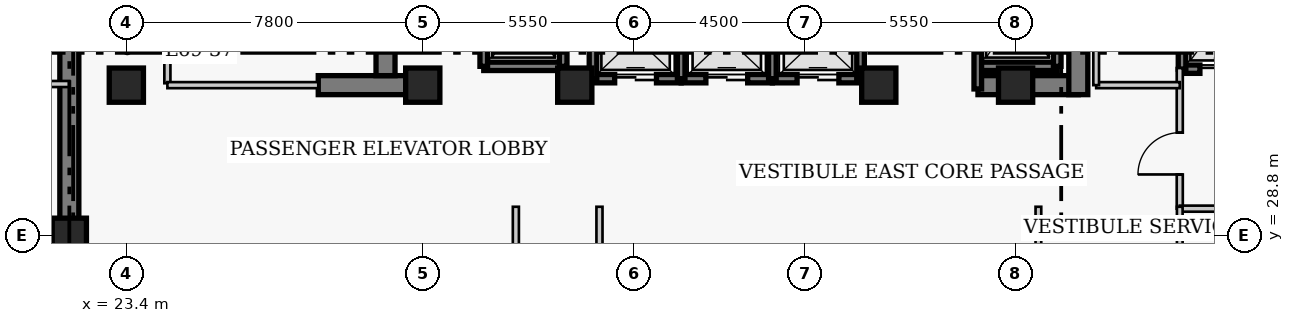
"""IFC4 building model, lengths in metres.
Left out: names, types, materials, properties, quantities, classifications, styles, units other than length and angle.
Written with IfcOpenShell. Run it as: python <this file> out.ifc"""

import sys

from ifc_helpers import new_model, si_unit, direction, frame, frame_2d, origin, origin_2d, place, context, subcontext, project, spatial, rectangle, extrude, element, fill, save


model = new_model("IFC4")
c1 = context("Model", 3, precision=1e-05, world=origin(), true_north=direction((0.0, 1.0)))
c2 = subcontext(c1, "Body", "Model", "MODEL_VIEW")
j1 = project(units=[si_unit("LENGTHUNIT", "METRE"), si_unit("PLANEANGLEUNIT", "RADIAN")], contexts=[c1])
p1 = place(None, origin())
s1 = spatial("IfcSite", under=j1, at=p1, CompositionType="ELEMENT")
p2 = place(p1, origin())
s2 = spatial("IfcBuilding", under=s1, at=p2, CompositionType="ELEMENT")
p3 = place(p2, frame((0.0, 0.0, 277.4)))
s3 = spatial("IfcBuildingStorey", under=s2, at=p3, CompositionType="ELEMENT", Elevation=277.4)
p4 = place(p3, frame((21.9, 27.05, 0.0), z_axis=(0.0, 0.0, 1.0), x_axis=(0.0, 1.0, 0.0)))
e1 = element("IfcWall", 1, at=p4, inside=s3, PredefinedType="SHEAR", context=c2, shape_type="SweptSolid", body=[
    extrude(rectangle(XDim=13.52, YDim=0.5, at=frame_2d((6.76, 0.0))), origin(), (0.0, 0.0, 1.0), 4.0),
])
p5 = place(p3, frame((28.45, 32.75, 0.0), z_axis=(0.0, 0.0, 1.0), x_axis=(1.0, 0.0, 0.0)))
e2 = element("IfcWall", 2, at=p5, inside=s3, PredefinedType="SHEAR", context=c2, shape_type="SweptSolid", body=[
    extrude(rectangle(XDim=2.4, YDim=0.5, at=frame_2d((1.2, 0.0))), origin(), (0.0, 0.0, 1.0), 4.0),
])
p6 = place(p3, frame((45.81, 32.75, 0.0), z_axis=(0.0, 0.0, 1.0), x_axis=(1.0, 0.0, 0.0)))
e3 = element("IfcWall", 3, at=p6, inside=s3, PredefinedType="SHEAR", context=c2, shape_type="SweptSolid", body=[
    extrude(rectangle(XDim=2.64, YDim=0.5, at=frame_2d((1.32, 0.0))), origin(), (0.0, 0.0, 1.0), 4.0),
])
p7 = place(p3, frame((30.22, 33.0, 0.0), z_axis=(0.0, 0.0, 1.0), x_axis=(0.0, 1.0, 0.0)))
e4 = element("IfcWall", 4, at=p7, inside=s3, PredefinedType="SHEAR", context=c2, shape_type="SweptSolid", body=[
    extrude(rectangle(XDim=7.32, YDim=0.5, at=frame_2d((3.66, 0.0))), origin(), (0.0, 0.0, 1.0), 4.0),
])
p8 = place(p3, frame((48.45, 32.5, 0.0), z_axis=(0.0, 0.0, 1.0), x_axis=(0.0, 1.0, 0.0)))
e5 = element("IfcWall", 5, at=p8, inside=s3, PredefinedType="SHEAR", context=c2, shape_type="SweptSolid", body=[
    extrude(rectangle(XDim=7.82, YDim=0.5, at=frame_2d((3.91, 0.0))), origin(), (0.0, 0.0, 1.0), 4.0),
])
p9 = place(p8, frame((5.7, 0.0, 0.0)))
e6 = element("IfcOpeningElement", 6, at=p9, cuts=e5, PredefinedType="OPENING", context=c2, shape_type="SweptSolid", body=[
    extrude(rectangle(XDim=1.1, YDim=2.15, at=frame_2d((0.55, 1.075))), frame((0.0, 0.26, 0.0), z_axis=(0.0, -1.0, 0.0), x_axis=(1.0, 0.0, 0.0)), (0.0, 0.0, 1.0), 0.52),
])
for number, where, z_axis, x_axis in (
    (7, (21.9, 28.8, 0.0), (0.0, 0.0, 1.0), (1.0, 0.0, 0.0)),
    (8, (23.4, 32.75, 0.0), (0.0, 0.0, 1.0), (1.0, 0.0, 0.0)),
    (9, (31.2, 32.75, 0.0), (0.0, 0.0, 1.0), (1.0, 0.0, 0.0)),
    (10, (35.2, 32.75, 0.0), (0.0, 0.0, 1.0), (1.0, 0.0, 0.0)),
    (11, (43.2, 32.75, 0.0), (0.0, 0.0, 1.0), (1.0, 0.0, 0.0)),
    (12, (46.8, 32.75, 0.0), (0.0, 0.0, 1.0), (1.0, 0.0, 0.0)),
):
    element("IfcColumn", number, at=place(p3, frame(where, z_axis=z_axis, x_axis=x_axis)), inside=s3, PredefinedType="COLUMN", context=c2, shape_type="SweptSolid", body=[
        extrude(rectangle(XDim=0.9, YDim=0.9, at=origin_2d()), origin(), (0.0, 0.0, 1.0), 4.0),
    ])
p10 = place(p3, frame((35.68, 32.92, 0.0), z_axis=(0.0, 0.0, 1.0), x_axis=(1.0, 0.0, 0.0)))
e13 = element("IfcWall", 13, at=p10, inside=s3, PredefinedType="SHEAR", context=c2, shape_type="SweptSolid", body=[
    extrude(rectangle(XDim=2.32, YDim=0.22, at=frame_2d((1.16, 0.0))), origin(), (0.0, 0.0, 1.0), 4.0),
])
p11 = place(p10, frame((0.57, 0.0, 0.0)))
e14 = element("IfcOpeningElement", 14, at=p11, cuts=e13, PredefinedType="OPENING", context=c2, shape_type="SweptSolid", body=[
    extrude(rectangle(XDim=1.1, YDim=2.15, at=frame_2d((0.55, 1.075))), frame((0.0, 0.12, 0.0), z_axis=(0.0, -1.0, 0.0), x_axis=(1.0, 0.0, 0.0)), (0.0, 0.0, 1.0), 0.24),
])
p12 = place(p3, frame((35.68, 32.92, 0.0), z_axis=(0.0, 0.0, 1.0), x_axis=(0.0, 1.0, 0.0)))
e15 = element("IfcWall", 15, at=p12, inside=s3, PredefinedType="SHEAR", context=c2, shape_type="SweptSolid", body=[
    extrude(rectangle(XDim=2.16, YDim=0.2, at=frame_2d((1.08, 0.0))), origin(), (0.0, 0.0, 1.0), 4.0),
])
p13 = place(p3, frame((38.0, 32.92, 0.0), z_axis=(0.0, 0.0, 1.0), x_axis=(1.0, 0.0, 0.0)))
e16 = element("IfcWall", 16, at=p13, inside=s3, PredefinedType="SHEAR", context=c2, shape_type="SweptSolid", body=[
    extrude(rectangle(XDim=2.4, YDim=0.22, at=frame_2d((1.2, 0.0))), origin(), (0.0, 0.0, 1.0), 4.0),
])
p14 = place(p13, frame((0.65, 0.0, 0.0)))
e17 = element("IfcOpeningElement", 17, at=p14, cuts=e16, PredefinedType="OPENING", context=c2, shape_type="SweptSolid", body=[
    extrude(rectangle(XDim=1.1, YDim=2.15, at=frame_2d((0.55, 1.075))), frame((0.0, 0.12, 0.0), z_axis=(0.0, -1.0, 0.0), x_axis=(1.0, 0.0, 0.0)), (0.0, 0.0, 1.0), 0.24),
])
p15 = place(p3, frame((38.0, 32.92, 0.0), z_axis=(0.0, 0.0, 1.0), x_axis=(0.0, 1.0, 0.0)))
e18 = element("IfcWall", 18, at=p15, inside=s3, PredefinedType="SHEAR", context=c2, shape_type="SweptSolid", body=[
    extrude(rectangle(XDim=2.16, YDim=0.2, at=frame_2d((1.08, 0.0))), origin(), (0.0, 0.0, 1.0), 4.0),
])
p16 = place(p3, frame((40.4, 32.92, 0.0), z_axis=(0.0, 0.0, 1.0), x_axis=(1.0, 0.0, 0.0)))
e19 = element("IfcWall", 19, at=p16, inside=s3, PredefinedType="SHEAR", context=c2, shape_type="SweptSolid", body=[
    extrude(rectangle(XDim=2.32, YDim=0.22, at=frame_2d((1.16, 0.0))), origin(), (0.0, 0.0, 1.0), 4.0),
])
p17 = place(p16, frame((0.65, 0.0, 0.0)))
e20 = element("IfcOpeningElement", 20, at=p17, cuts=e19, PredefinedType="OPENING", context=c2, shape_type="SweptSolid", body=[
    extrude(rectangle(XDim=1.1, YDim=2.15, at=frame_2d((0.55, 1.075))), frame((0.0, 0.12, 0.0), z_axis=(0.0, -1.0, 0.0), x_axis=(1.0, 0.0, 0.0)), (0.0, 0.0, 1.0), 0.24),
])
for number, where, z_axis, x_axis in (
    (21, (40.4, 32.92, 0.0), (0.0, 0.0, 1.0), (0.0, 1.0, 0.0)),
    (22, (42.72, 32.92, 0.0), (0.0, 0.0, 1.0), (0.0, 1.0, 0.0)),
):
    element("IfcWall", number, at=place(p3, frame(where, z_axis=z_axis, x_axis=x_axis)), inside=s3, PredefinedType="SHEAR", context=c2, shape_type="SweptSolid", body=[
        extrude(rectangle(XDim=2.16, YDim=0.2, at=frame_2d((1.08, 0.0))), origin(), (0.0, 0.0, 1.0), 4.0),
    ])
p18 = place(p3, frame((51.18, 33.17, 0.0), z_axis=(0.0, 0.0, 1.0), x_axis=(1.0, 0.0, 0.0)))
e23 = element("IfcWall", 23, at=p18, inside=s3, PredefinedType="SHEAR", context=c2, shape_type="SweptSolid", body=[
    extrude(rectangle(XDim=2.42, YDim=0.22, at=frame_2d((1.21, 0.0))), origin(), (0.0, 0.0, 1.0), 4.0),
])
p19 = place(p18, frame((0.47, 0.0, 0.0)))
e24 = element("IfcOpeningElement", 24, at=p19, cuts=e23, PredefinedType="OPENING", context=c2, shape_type="SweptSolid", body=[
    extrude(rectangle(XDim=1.3, YDim=2.15, at=frame_2d((0.65, 1.075))), frame((0.0, 0.12, 0.0), z_axis=(0.0, -1.0, 0.0), x_axis=(1.0, 0.0, 0.0)), (0.0, 0.0, 1.0), 0.24),
])
p20 = place(p3, frame((51.18, 33.17, 0.0), z_axis=(0.0, 0.0, 1.0), x_axis=(0.0, 1.0, 0.0)))
e25 = element("IfcWall", 25, at=p20, inside=s3, PredefinedType="SHEAR", context=c2, shape_type="SweptSolid", body=[
    extrude(rectangle(XDim=2.86, YDim=0.2, at=frame_2d((1.43, 0.0))), origin(), (0.0, 0.0, 1.0), 4.0),
])
p21 = place(p3, frame((32.805, 33.245, 0.0), z_axis=(0.0, 0.0, 1.0), x_axis=(1.0, 0.0, 0.0)))
e26 = element("IfcWall", 26, at=p21, inside=s3, PredefinedType="SHEAR", context=c2, shape_type="SweptSolid", body=[
    extrude(rectangle(XDim=2.09, YDim=0.22, at=frame_2d((1.045, 0.0))), origin(), (0.0, 0.0, 1.0), 4.0),
])
for number, where, z_axis, x_axis in (
    (27, (32.805, 33.245, 0.0), (0.0, 0.0, 1.0), (0.0, 1.0, 0.0)),
    (28, (34.895, 33.245, 0.0), (0.0, 0.0, 1.0), (0.0, 1.0, 0.0)),
):
    element("IfcWall", number, at=place(p3, frame(where, z_axis=z_axis, x_axis=x_axis)), inside=s3, PredefinedType="SHEAR", context=c2, shape_type="SweptSolid", body=[
        extrude(rectangle(XDim=2.91, YDim=0.2, at=frame_2d((1.455, 0.0))), origin(), (0.0, 0.0, 1.0), 4.0),
    ])
p22 = place(p3, frame((45.805, 33.245, 0.0), z_axis=(0.0, 0.0, 1.0), x_axis=(1.0, 0.0, 0.0)))
e29 = element("IfcWall", 29, at=p22, inside=s3, PredefinedType="SHEAR", context=c2, shape_type="SweptSolid", body=[
    extrude(rectangle(XDim=2.09, YDim=0.22, at=frame_2d((1.045, 0.0))), origin(), (0.0, 0.0, 1.0), 4.0),
])
p23 = place(p3, frame((45.805, 32.65, 0.0), z_axis=(0.0, 0.0, 1.0), x_axis=(0.0, 1.0, 0.0)))
e30 = element("IfcWall", 30, at=p23, inside=s3, PredefinedType="SHEAR", context=c2, shape_type="SweptSolid", body=[
    extrude(rectangle(XDim=3.505, YDim=0.2, at=frame_2d((1.752, 0.0))), origin(), (0.0, 0.0, 1.0), 4.0),
])
p24 = place(p3, frame((47.895, 33.245, 0.0), z_axis=(0.0, 0.0, 1.0), x_axis=(0.0, 1.0, 0.0)))
e31 = element("IfcWall", 31, at=p24, inside=s3, PredefinedType="SHEAR", context=c2, shape_type="SweptSolid", body=[
    extrude(rectangle(XDim=2.91, YDim=0.2, at=frame_2d((1.455, 0.0))), origin(), (0.0, 0.0, 1.0), 4.0),
])
p25 = place(p3, frame((24.48, 32.8, 0.0), z_axis=(0.0, 0.0, 1.0), x_axis=(0.0, 1.0, 0.0)))
e32 = element("IfcWall", 32, at=p25, inside=s3, PredefinedType="PARTITIONING", context=c2, shape_type="SweptSolid", body=[
    extrude(rectangle(XDim=3.57, YDim=0.16, at=frame_2d((1.785, 0.0))), origin(), (0.0, 0.0, 1.0), 3.76),
])
p26 = place(p25, frame((1.604, 0.0, 0.0)))
e33 = element("IfcOpeningElement", 33, at=p26, cuts=e32, PredefinedType="OPENING", context=c2, shape_type="SweptSolid", body=[
    extrude(rectangle(XDim=0.9, YDim=2.1, at=frame_2d((0.45, 1.05))), frame((0.0, 0.09, 0.0), z_axis=(0.0, -1.0, 0.0), x_axis=(1.0, 0.0, 0.0)), (0.0, 0.0, 1.0), 0.18),
])
p27 = place(p3, frame((51.12, 29.5, 0.0), z_axis=(0.0, 0.0, 1.0), x_axis=(0.0, 1.0, 0.0)))
e34 = element("IfcWall", 34, at=p27, inside=s3, PredefinedType="PARTITIONING", context=c2, shape_type="SweptSolid", body=[
    extrude(rectangle(XDim=3.7, YDim=0.16, at=frame_2d((1.85, 0.0))), origin(), (0.0, 0.0, 1.0), 3.76),
])
p28 = place(p27, frame((0.9, 0.0, 0.0)))
e35 = element("IfcOpeningElement", 35, at=p28, cuts=e34, PredefinedType="OPENING", context=c2, shape_type="SweptSolid", body=[
    extrude(rectangle(XDim=1.1, YDim=2.15, at=frame_2d((0.55, 1.075))), frame((0.0, 0.09, 0.0), z_axis=(0.0, -1.0, 0.0), x_axis=(1.0, 0.0, 0.0)), (0.0, 0.0, 1.0), 0.18),
])
p29 = place(p3, frame((51.12, 29.5, 0.0), z_axis=(0.0, 0.0, 1.0), x_axis=(1.0, 0.0, 0.0)))
e36 = element("IfcWall", 36, at=p29, inside=s3, PredefinedType="PARTITIONING", context=c2, shape_type="SweptSolid", body=[
    extrude(rectangle(XDim=5.63, YDim=0.16, at=frame_2d((2.815, 0.0))), origin(), (0.0, 0.0, 1.0), 3.76),
])
p30 = place(p3, frame((24.48, 32.75, 0.0), z_axis=(0.0, 0.0, 1.0), x_axis=(1.0, 0.0, 0.0)))
e37 = element("IfcWall", 37, at=p30, inside=s3, PredefinedType="PARTITIONING", context=c2, shape_type="SweptSolid", body=[
    extrude(rectangle(XDim=3.97, YDim=0.16, at=frame_2d((1.985, 0.0))), origin(), (0.0, 0.0, 1.0), 3.76),
])
p31 = place(p3, frame((48.92, 32.75, 0.0), z_axis=(0.0, 0.0, 1.0), x_axis=(1.0, 0.0, 0.0)))
e38 = element("IfcWall", 38, at=p31, inside=s3, PredefinedType="PARTITIONING", context=c2, shape_type="SweptSolid", body=[
    extrude(rectangle(XDim=2.2, YDim=0.16, at=frame_2d((1.1, 0.0))), origin(), (0.0, 0.0, 1.0), 3.76),
])
p32 = place(p3, frame((48.92, 32.75, 0.0), z_axis=(0.0, 0.0, 1.0), x_axis=(0.0, 1.0, 0.0)))
e39 = element("IfcWall", 39, at=p32, inside=s3, PredefinedType="PARTITIONING", context=c2, shape_type="SweptSolid", body=[
    extrude(rectangle(XDim=3.62, YDim=0.15, at=frame_2d((1.81, 0.0))), origin(), (0.0, 0.0, 1.0), 3.76),
])
for number, where, z_axis, x_axis in (
    (40, (33.65, 24.71, 0.0), (0.0, 0.0, 1.0), (0.0, 1.0, 0.0)),
    (41, (35.85, 24.71, 0.0), (0.0, 0.0, 1.0), (0.0, 1.0, 0.0)),
):
    element("IfcWall", number, at=place(p3, frame(where, z_axis=z_axis, x_axis=x_axis)), inside=s3, PredefinedType="PARTITIONING", context=c2, shape_type="SweptSolid", body=[
        extrude(rectangle(XDim=4.84, YDim=0.16, at=frame_2d((2.42, 0.0))), origin(), (0.0, 0.0, 1.0), 3.76),
    ])
p33 = place(p3, frame((19.16, 32.78, 0.0), z_axis=(0.0, 0.0, 1.0), x_axis=(1.0, 0.0, 0.0)))
e42 = element("IfcWall", 42, at=p33, inside=s3, PredefinedType="PARTITIONING", context=c2, shape_type="SweptSolid", body=[
    extrude(rectangle(XDim=2.74, YDim=0.16, at=frame_2d((1.37, 0.0))), origin(), (0.0, 0.0, 1.0), 3.76),
])
for number, where, z_axis, x_axis in (
    (43, (47.4, 24.71, 0.0), (0.0, 0.0, 1.0), (0.0, 1.0, 0.0)),
    (44, (51.12, 24.71, 0.0), (0.0, 0.0, 1.0), (0.0, 1.0, 0.0)),
):
    element("IfcWall", number, at=place(p3, frame(where, z_axis=z_axis, x_axis=x_axis)), inside=s3, PredefinedType="PARTITIONING", context=c2, shape_type="SweptSolid", body=[
        extrude(rectangle(XDim=4.84, YDim=0.15, at=frame_2d((2.42, 0.0))), origin(), (0.0, 0.0, 1.0), 3.76),
    ])
p34 = place(p11, origin())
e45 = element("IfcDoor", 45, at=p34, inside=s3, OperationType="DOUBLE_DOOR_SLIDING", PredefinedType="DOOR", context=c2, shape_type="SweptSolid", body=[
    extrude(rectangle(XDim=1.1, YDim=2.15, at=frame_2d((0.55, 1.075))), frame((0.0, 0.025, 0.0), z_axis=(0.0, -1.0, 0.0), x_axis=(1.0, 0.0, 0.0)), (0.0, 0.0, 1.0), 0.05),
])
fill(e14, e45)
p35 = place(p14, origin())
e46 = element("IfcDoor", 46, at=p35, inside=s3, OperationType="DOUBLE_DOOR_SLIDING", PredefinedType="DOOR", context=c2, shape_type="SweptSolid", body=[
    extrude(rectangle(XDim=1.1, YDim=2.15, at=frame_2d((0.55, 1.075))), frame((0.0, 0.025, 0.0), z_axis=(0.0, -1.0, 0.0), x_axis=(1.0, 0.0, 0.0)), (0.0, 0.0, 1.0), 0.05),
])
fill(e17, e46)
p36 = place(p17, origin())
e47 = element("IfcDoor", 47, at=p36, inside=s3, OperationType="DOUBLE_DOOR_SLIDING", PredefinedType="DOOR", context=c2, shape_type="SweptSolid", body=[
    extrude(rectangle(XDim=1.1, YDim=2.15, at=frame_2d((0.55, 1.075))), frame((0.0, 0.025, 0.0), z_axis=(0.0, -1.0, 0.0), x_axis=(1.0, 0.0, 0.0)), (0.0, 0.0, 1.0), 0.05),
])
fill(e20, e47)
p37 = place(p19, origin())
e48 = element("IfcDoor", 48, at=p37, inside=s3, OperationType="DOUBLE_DOOR_SLIDING", PredefinedType="DOOR", context=c2, shape_type="SweptSolid", body=[
    extrude(rectangle(XDim=1.3, YDim=2.15, at=frame_2d((0.65, 1.075))), frame((0.0, 0.025, 0.0), z_axis=(0.0, -1.0, 0.0), x_axis=(1.0, 0.0, 0.0)), (0.0, 0.0, 1.0), 0.05),
])
fill(e24, e48)
p38 = place(p28, origin())
e49 = element("IfcDoor", 49, at=p38, inside=s3, OperationType="SINGLE_SWING_LEFT", PredefinedType="DOOR", context=c2, shape_type="SweptSolid", body=[
    extrude(rectangle(XDim=1.1, YDim=2.15, at=frame_2d((0.55, 1.075))), frame((0.0, 0.025, 0.0), z_axis=(0.0, -1.0, 0.0), x_axis=(1.0, 0.0, 0.0)), (0.0, 0.0, 1.0), 0.05),
])
fill(e35, e49)
save(model, sys.argv[1])
